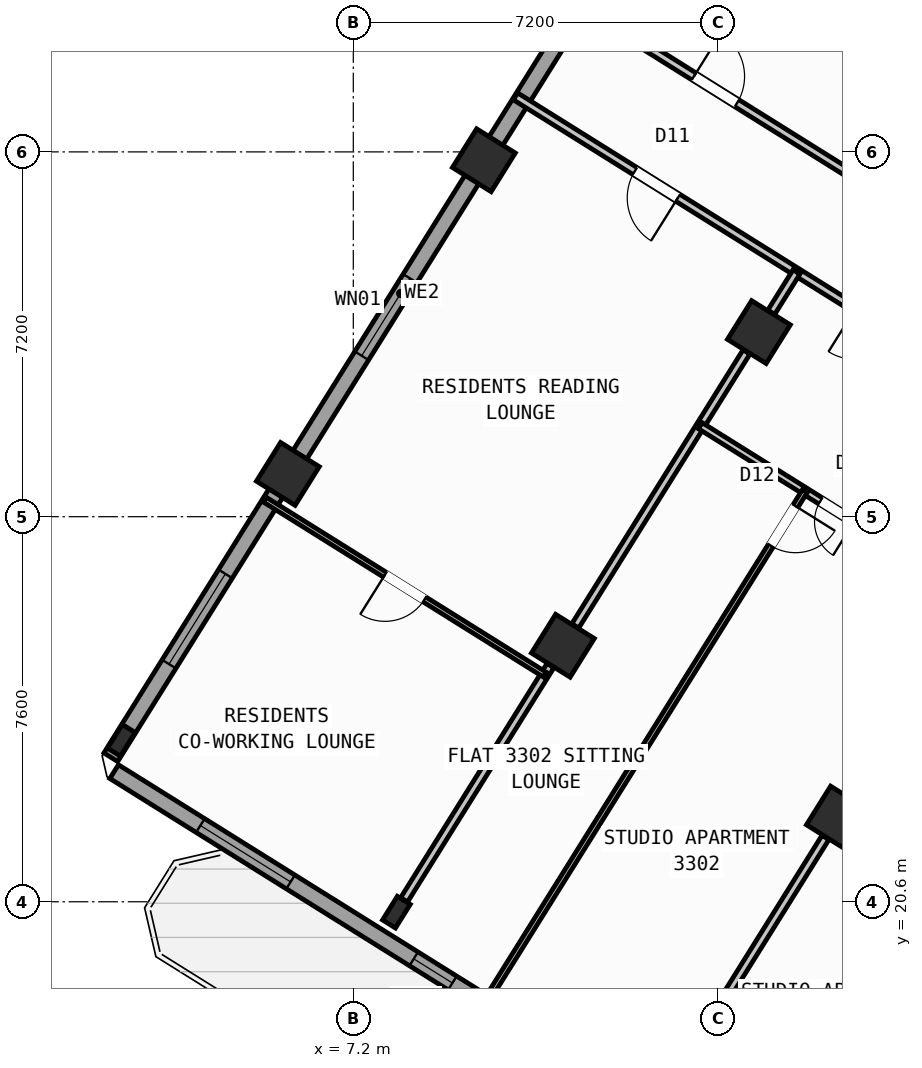
"""IFC4 building model, lengths in metres.
Left out: names, types, materials, properties, quantities, classifications, styles, units other than length and angle.
Written with IfcOpenShell. Run it as: python <this file> out.ifc"""

import sys

from ifc_helpers import new_model, si_unit, direction, frame, frame_2d, origin, origin_2d, place, context, subcontext, project, spatial, rectangle, hollow_rectangle, i_section, extrude, source, transform, mapped, element, fill, save


model = new_model("IFC4")
c1 = context("Model", 3, precision=1e-05, world=origin(), true_north=direction((0.0, 1.0)))
c2 = subcontext(c1, "Body", "Model", "MODEL_VIEW")
j1 = project(units=[si_unit("LENGTHUNIT", "METRE"), si_unit("PLANEANGLEUNIT", "RADIAN")], contexts=[c1])
p1 = place(None, origin())
s1 = spatial("IfcSite", under=j1, at=p1, CompositionType="ELEMENT")
p2 = place(p1, origin())
s2 = spatial("IfcBuilding", under=s1, at=p2, CompositionType="ELEMENT")
p3 = place(p2, frame((0.0, 0.0, 132.6)))
s3 = spatial("IfcBuildingStorey", under=s2, at=p3, CompositionType="ELEMENT", Elevation=132.6)
m1 = source(origin(), c2, "Body", "SweptSolid", [
    extrude(hollow_rectangle(XDim=0.9, YDim=0.9, WallThickness=0.036, at=origin_2d()), origin(), (0.0, 0.0, 1.0), 3.6),
])
for number, where, z_axis, x_axis in (
    (1, (16.764, 22.261, 0.0), (0.0, 0.0, 1.0), (-0.848, 0.53, 0.0)),
    (2, (15.205, 31.844, 0.0), (0.0, 0.0, 1.0), (-0.848, 0.53, 0.0)),
    (3, (11.336, 25.653, 0.0), (0.0, 0.0, 1.0), (-0.848, 0.53, 0.0)),
):
    element("IfcColumn", number, at=place(p3, frame(where, z_axis=z_axis, x_axis=x_axis)), inside=s3, PredefinedType="COLUMN", context=c2, shape_type="MappedRepresentation", body=[
        mapped(m1, transform((0.0, 0.0, 0.0), scale=1.0)),
    ])
m2 = source(origin(), c2, "Body", "SweptSolid", [
    extrude(i_section(OverallWidth=0.3, OverallDepth=0.55, WebThickness=0.015, FlangeThickness=0.029, at=origin_2d()), origin(), (0.0, 0.0, 1.0), 3.6),
])
p4 = place(p3, frame((8.051, 20.395, 0.0), z_axis=(0.0, 0.0, 1.0), x_axis=(-0.848048096156, 0.529919264233, 0.0)))
e4 = element("IfcColumn", 4, at=p4, inside=s3, PredefinedType="COLUMN", context=c2, shape_type="MappedRepresentation", body=[
    mapped(m2, transform((0.0, 0.0, 0.0), scale=1.0)),
])
for number, where, z_axis, x_axis in (
    (5, (9.777, 35.235, 0.0), (0.0, 0.0, 1.0), (-0.848, 0.53, 0.0)),
    (6, (5.909, 29.044, 0.0), (0.0, 0.0, 1.0), (-0.848, 0.53, 0.0)),
):
    element("IfcColumn", number, at=place(p3, frame(where, z_axis=z_axis, x_axis=x_axis)), inside=s3, PredefinedType="COLUMN", context=c2, shape_type="MappedRepresentation", body=[
        mapped(m1, transform((0.0, 0.0, 0.0), scale=1.0)),
    ])
p5 = place(p3, frame((2.623, 23.786, 0.0), z_axis=(0.0, 0.0, 1.0), x_axis=(-0.848048096156, 0.529919264233, 0.0)))
e7 = element("IfcColumn", 7, at=p5, inside=s3, PredefinedType="COLUMN", context=c2, shape_type="MappedRepresentation", body=[
    mapped(m2, transform((0.0, 0.0, 0.0), scale=1.0)),
])
p6 = place(p3, frame((29.268, 6.429, 0.0), z_axis=(0.0, 0.0, 1.0), x_axis=(-0.848049971435, 0.529916263149, 0.0)))
e8 = element("IfcWall", 8, at=p6, inside=s3, PredefinedType="STANDARD", context=c2, shape_type="SweptSolid", body=[
    extrude(rectangle(XDim=31.588, YDim=0.32, at=frame_2d((15.794, 0.0))), origin(), (0.0, 0.0, 1.0), 3.32),
])
p7 = place(p6, frame((16.362, 0.0, 0.0)))
e9 = element("IfcOpeningElement", 9, at=p7, cuts=e8, PredefinedType="OPENING", context=c2, shape_type="SweptSolid", body=[
    extrude(rectangle(XDim=1.2, YDim=2.15, at=frame_2d((0.6, 1.075))), frame((0.0, 0.17, 0.0), z_axis=(0.0, -1.0, 0.0), x_axis=(1.0, 0.0, 0.0)), (0.0, 0.0, 1.0), 0.34),
])
p8 = place(p6, frame((2.989, 0.0, 0.8)))
e10 = element("IfcOpeningElement", 10, at=p8, cuts=e8, PredefinedType="OPENING", context=c2, shape_type="SweptSolid", body=[
    extrude(rectangle(XDim=2.1, YDim=1.55, at=frame_2d((1.05, 0.775))), frame((0.0, 0.17, 0.0), z_axis=(0.0, -1.0, 0.0), x_axis=(1.0, 0.0, 0.0)), (0.0, 0.0, 1.0), 0.34),
])
p9 = place(p6, frame((8.359, 0.0, 0.8)))
e11 = element("IfcOpeningElement", 11, at=p9, cuts=e8, PredefinedType="OPENING", context=c2, shape_type="SweptSolid", body=[
    extrude(rectangle(XDim=2.1, YDim=1.55, at=frame_2d((1.05, 0.775))), frame((0.0, 0.17, 0.0), z_axis=(0.0, -1.0, 0.0), x_axis=(1.0, 0.0, 0.0)), (0.0, 0.0, 1.0), 0.34),
])
p10 = place(p6, frame((13.284, 0.0, 0.95)))
e12 = element("IfcOpeningElement", 12, at=p10, cuts=e8, PredefinedType="OPENING", context=c2, shape_type="SweptSolid", body=[
    extrude(rectangle(XDim=1.2, YDim=1.4, at=frame_2d((0.6, 0.7))), frame((0.0, 0.17, 0.0), z_axis=(0.0, -1.0, 0.0), x_axis=(1.0, 0.0, 0.0)), (0.0, 0.0, 1.0), 0.34),
])
p11 = place(p6, frame((20.39, 0.0, 0.95)))
e13 = element("IfcOpeningElement", 13, at=p11, cuts=e8, PredefinedType="OPENING", context=c2, shape_type="SweptSolid", body=[
    extrude(rectangle(XDim=1.2, YDim=1.4, at=frame_2d((0.6, 0.7))), frame((0.0, 0.17, 0.0), z_axis=(0.0, -1.0, 0.0), x_axis=(1.0, 0.0, 0.0)), (0.0, 0.0, 1.0), 0.34),
])
p12 = place(p6, frame((23.715, 0.0, 1.0)))
e14 = element("IfcOpeningElement", 14, at=p12, cuts=e8, PredefinedType="OPENING", context=c2, shape_type="SweptSolid", body=[
    extrude(rectangle(XDim=0.9, YDim=1.25, at=frame_2d((0.45, 0.625))), frame((0.0, 0.17, 0.0), z_axis=(0.0, -1.0, 0.0), x_axis=(1.0, 0.0, 0.0)), (0.0, 0.0, 1.0), 0.34),
])
p13 = place(p6, frame((27.481, 0.0, 0.8)))
e15 = element("IfcOpeningElement", 15, at=p13, cuts=e8, PredefinedType="OPENING", context=c2, shape_type="SweptSolid", body=[
    extrude(rectangle(XDim=2.1, YDim=1.55, at=frame_2d((1.05, 0.775))), frame((0.0, 0.17, 0.0), z_axis=(0.0, -1.0, 0.0), x_axis=(1.0, 0.0, 0.0)), (0.0, 0.0, 1.0), 0.34),
])
p14 = place(p3, frame((2.415, 23.452, 0.0), z_axis=(0.0, 0.0, 1.0), x_axis=(0.52991049553, 0.848053575387, 0.0)))
e16 = element("IfcWall", 16, at=p14, inside=s3, PredefinedType="STANDARD", context=c2, shape_type="SweptSolid", body=[
    extrude(rectangle(XDim=21.587, YDim=0.32, at=frame_2d((10.794, 0.0))), origin(), (0.0, 0.0, 1.0), 2.745),
])
p15 = place(p14, frame((2.168, 0.0, 0.8)))
e17 = element("IfcOpeningElement", 17, at=p15, cuts=e16, PredefinedType="OPENING", context=c2, shape_type="SweptSolid", body=[
    extrude(rectangle(XDim=2.1, YDim=1.55, at=frame_2d((1.05, 0.775))), frame((0.0, 0.17, 0.0), z_axis=(0.0, -1.0, 0.0), x_axis=(1.0, 0.0, 0.0)), (0.0, 0.0, 1.0), 0.34),
])
p16 = place(p14, frame((9.344, 0.0, 0.85)))
e18 = element("IfcOpeningElement", 18, at=p16, cuts=e16, PredefinedType="OPENING", context=c2, shape_type="SweptSolid", body=[
    extrude(rectangle(XDim=1.8, YDim=1.5, at=frame_2d((0.9, 0.75))), frame((0.0, 0.17, 0.0), z_axis=(0.0, -1.0, 0.0), x_axis=(1.0, 0.0, 0.0)), (0.0, 0.0, 1.0), 0.34),
])
p17 = place(p14, frame((18.459, 0.0, 0.85)))
e19 = element("IfcOpeningElement", 19, at=p17, cuts=e16, PredefinedType="OPENING", context=c2, shape_type="SweptSolid", body=[
    extrude(rectangle(XDim=1.5, YDim=1.5, at=frame_2d((0.75, 0.75))), frame((0.0, 0.17, 0.0), z_axis=(0.0, -1.0, 0.0), x_axis=(1.0, 0.0, 0.0)), (0.0, 0.0, 1.0), 0.34),
])
p18 = place(p3, frame((14.138, 41.825, 0.0), z_axis=(0.0, 0.0, 1.0), x_axis=(0.848046498049, -0.529921821731, 0.0)))
e20 = element("IfcWall", 20, at=p18, inside=s3, PredefinedType="STANDARD", context=c2, shape_type="SweptSolid", body=[
    extrude(rectangle(XDim=31.588, YDim=0.32, at=frame_2d((15.794, 0.0))), origin(), (0.0, 0.0, 1.0), 3.32),
])
p19 = place(p18, frame((3.253, 0.0, 0.0)))
e21 = element("IfcOpeningElement", 21, at=p19, cuts=e20, PredefinedType="OPENING", context=c2, shape_type="SweptSolid", body=[
    extrude(rectangle(XDim=1.05, YDim=2.15, at=frame_2d((0.525, 1.075))), frame((0.0, 0.17, 0.0), z_axis=(0.0, -1.0, 0.0), x_axis=(1.0, 0.0, 0.0)), (0.0, 0.0, 1.0), 0.34),
])
p20 = place(p18, frame((0.863, 0.0, 0.85)))
e22 = element("IfcOpeningElement", 22, at=p20, cuts=e20, PredefinedType="OPENING", context=c2, shape_type="SweptSolid", body=[
    extrude(rectangle(XDim=1.8, YDim=1.5, at=frame_2d((0.9, 0.75))), frame((0.0, 0.17, 0.0), z_axis=(0.0, -1.0, 0.0), x_axis=(1.0, 0.0, 0.0)), (0.0, 0.0, 1.0), 0.34),
])
p21 = place(p18, frame((8.435, 0.0, 0.85)))
e23 = element("IfcOpeningElement", 23, at=p21, cuts=e20, PredefinedType="OPENING", context=c2, shape_type="SweptSolid", body=[
    extrude(rectangle(XDim=1.8, YDim=1.5, at=frame_2d((0.9, 0.75))), frame((0.0, 0.17, 0.0), z_axis=(0.0, -1.0, 0.0), x_axis=(1.0, 0.0, 0.0)), (0.0, 0.0, 1.0), 0.34),
])
p22 = place(p18, frame((13.874, 0.0, 0.85)))
e24 = element("IfcOpeningElement", 24, at=p22, cuts=e20, PredefinedType="OPENING", context=c2, shape_type="SweptSolid", body=[
    extrude(rectangle(XDim=1.5, YDim=1.5, at=frame_2d((0.75, 0.75))), frame((0.0, 0.17, 0.0), z_axis=(0.0, -1.0, 0.0), x_axis=(1.0, 0.0, 0.0)), (0.0, 0.0, 1.0), 0.34),
])
p23 = place(p18, frame((17.104, 0.0, 1.0)))
e25 = element("IfcOpeningElement", 25, at=p23, cuts=e20, PredefinedType="OPENING", context=c2, shape_type="SweptSolid", body=[
    extrude(rectangle(XDim=0.9, YDim=1.25, at=frame_2d((0.45, 0.625))), frame((0.0, 0.17, 0.0), z_axis=(0.0, -1.0, 0.0), x_axis=(1.0, 0.0, 0.0)), (0.0, 0.0, 1.0), 0.34),
])
p24 = place(p18, frame((22.131, 0.0, 1.0)))
e26 = element("IfcOpeningElement", 26, at=p24, cuts=e20, PredefinedType="OPENING", context=c2, shape_type="SweptSolid", body=[
    extrude(rectangle(XDim=0.9, YDim=1.25, at=frame_2d((0.45, 0.625))), frame((0.0, 0.17, 0.0), z_axis=(0.0, -1.0, 0.0), x_axis=(1.0, 0.0, 0.0)), (0.0, 0.0, 1.0), 0.34),
])
p25 = place(p18, frame((27.706, 0.0, 1.0)))
e27 = element("IfcOpeningElement", 27, at=p25, cuts=e20, PredefinedType="OPENING", context=c2, shape_type="SweptSolid", body=[
    extrude(rectangle(XDim=0.9, YDim=1.25, at=frame_2d((0.45, 0.625))), frame((0.0, 0.17, 0.0), z_axis=(0.0, -1.0, 0.0), x_axis=(1.0, 0.0, 0.0)), (0.0, 0.0, 1.0), 0.34),
])
p26 = place(p3, frame((24.588, 27.631, 0.0), z_axis=(0.0, 0.0, 1.0), x_axis=(-0.529914586043, -0.848051019396, 0.0)))
e28 = element("IfcWall", 28, at=p26, inside=s3, PredefinedType="PARTITIONING", context=c2, shape_type="SweptSolid", body=[
    extrude(rectangle(XDim=15.35, YDim=0.16, at=frame_2d((7.675, 0.0))), origin(), (0.0, 0.0, 1.0), 3.31),
])
p27 = place(p3, frame((25.754, 29.497, 0.0), z_axis=(0.0, 0.0, 1.0), x_axis=(-0.848045850158, 0.529922858565, 0.0)))
e29 = element("IfcWall", 29, at=p27, inside=s3, PredefinedType="PARTITIONING", context=c2, shape_type="SweptSolid", body=[
    extrude(rectangle(XDim=16.73, YDim=0.16, at=frame_2d((8.365, 0.0))), origin(), (0.0, 0.0, 1.0), 3.31),
])
p28 = place(p27, frame((1.588, 0.0, 0.0)))
e30 = element("IfcOpeningElement", 30, at=p28, cuts=e29, PredefinedType="OPENING", context=c2, shape_type="SweptSolid", body=[
    extrude(rectangle(XDim=1.0, YDim=2.1, at=frame_2d((0.5, 1.05))), frame((0.0, 0.09, 0.0), z_axis=(0.0, -1.0, 0.0), x_axis=(1.0, 0.0, 0.0)), (0.0, 0.0, 1.0), 0.18),
])
p29 = place(p27, frame((6.685, 0.0, 0.0)))
e31 = element("IfcOpeningElement", 31, at=p29, cuts=e29, PredefinedType="OPENING", context=c2, shape_type="SweptSolid", body=[
    extrude(rectangle(XDim=1.0, YDim=2.1, at=frame_2d((0.5, 1.05))), frame((0.0, 0.09, 0.0), z_axis=(0.0, -1.0, 0.0), x_axis=(1.0, 0.0, 0.0)), (0.0, 0.0, 1.0), 0.18),
])
p30 = place(p27, frame((12.951, 0.0, 0.0)))
e32 = element("IfcOpeningElement", 32, at=p30, cuts=e29, PredefinedType="OPENING", context=c2, shape_type="SweptSolid", body=[
    extrude(rectangle(XDim=1.0, YDim=2.1, at=frame_2d((0.5, 1.05))), frame((0.0, 0.09, 0.0), z_axis=(0.0, -1.0, 0.0), x_axis=(1.0, 0.0, 0.0)), (0.0, 0.0, 1.0), 0.18),
])
p31 = place(p3, frame((24.588, 27.631, 0.0), z_axis=(0.0, 0.0, 1.0), x_axis=(-0.848041752158, 0.529929416617, 0.0)))
e33 = element("IfcWall", 33, at=p31, inside=s3, PredefinedType="PARTITIONING", context=c2, shape_type="SweptSolid", body=[
    extrude(rectangle(XDim=16.73, YDim=0.16, at=frame_2d((8.365, 0.0))), origin(), (0.0, 0.0, 1.0), 3.31),
])
p32 = place(p31, frame((2.22, 0.0, 0.0)))
e34 = element("IfcOpeningElement", 34, at=p32, cuts=e33, PredefinedType="OPENING", context=c2, shape_type="SweptSolid", body=[
    extrude(rectangle(XDim=0.86, YDim=2.05, at=frame_2d((0.43, 1.025))), frame((0.0, 0.09, 0.0), z_axis=(0.0, -1.0, 0.0), x_axis=(1.0, 0.0, 0.0)), (0.0, 0.0, 1.0), 0.18),
])
p33 = place(p31, frame((7.82, 0.0, 0.0)))
e35 = element("IfcOpeningElement", 35, at=p33, cuts=e33, PredefinedType="OPENING", context=c2, shape_type="SweptSolid", body=[
    extrude(rectangle(XDim=1.0, YDim=2.1, at=frame_2d((0.5, 1.05))), frame((0.0, 0.09, 0.0), z_axis=(0.0, -1.0, 0.0), x_axis=(1.0, 0.0, 0.0)), (0.0, 0.0, 1.0), 0.18),
])
p34 = place(p31, frame((12.95, 0.0, 0.0)))
e36 = element("IfcOpeningElement", 36, at=p34, cuts=e33, PredefinedType="OPENING", context=c2, shape_type="SweptSolid", body=[
    extrude(rectangle(XDim=1.0, YDim=2.1, at=frame_2d((0.5, 1.05))), frame((0.0, 0.09, 0.0), z_axis=(0.0, -1.0, 0.0), x_axis=(1.0, 0.0, 0.0)), (0.0, 0.0, 1.0), 0.18),
])
p35 = place(p3, frame((16.519, 21.87, 0.0), z_axis=(0.0, 0.0, 1.0), x_axis=(-0.529922447305, -0.848046107144, 0.0)))
e37 = element("IfcWall", 37, at=p35, inside=s3, PredefinedType="PARTITIONING", context=c2, shape_type="SweptSolid", body=[
    extrude(rectangle(XDim=5.451, YDim=0.16, at=frame_2d((2.726, 0.0))), origin(), (0.0, 0.0, 1.0), 2.745),
])
p36 = place(p3, frame((15.946, 33.031, 0.0), z_axis=(0.0, 0.0, 1.0), x_axis=(-0.529952145338, -0.848027548876, 0.0)))
e38 = element("IfcWall", 38, at=p36, inside=s3, PredefinedType="PARTITIONING", context=c2, shape_type="SweptSolid", body=[
    extrude(rectangle(XDim=0.938, YDim=0.16, at=frame_2d((0.469, 0.0))), origin(), (0.0, 0.0, 1.0), 2.745),
])
p37 = place(p3, frame((14.96, 31.452, 0.0), z_axis=(0.0, 0.0, 1.0), x_axis=(-0.529947310719, -0.848030570122, 0.0)))
e39 = element("IfcWall", 39, at=p37, inside=s3, PredefinedType="PARTITIONING", context=c2, shape_type="SweptSolid", body=[
    extrude(rectangle(XDim=6.376, YDim=0.16, at=frame_2d((3.188, 0.0))), origin(), (0.0, 0.0, 1.0), 2.745),
])
p38 = place(p3, frame((11.091, 25.261, 0.0), z_axis=(0.0, 0.0, 1.0), x_axis=(-0.52994257524, -0.848033529377, 0.0)))
e40 = element("IfcWall", 40, at=p38, inside=s3, PredefinedType="PARTITIONING", context=c2, shape_type="SweptSolid", body=[
    extrude(rectangle(XDim=5.451, YDim=0.16, at=frame_2d((2.726, 0.0))), origin(), (0.0, 0.0, 1.0), 2.745),
])
p39 = place(p3, frame((19.477, 26.603, 0.0), z_axis=(0.0, 0.0, 1.0), x_axis=(-0.848039019877, 0.529933789039, 0.0)))
e41 = element("IfcWall", 41, at=p39, inside=s3, PredefinedType="PLUMBINGWALL", context=c2, shape_type="SweptSolid", body=[
    extrude(rectangle(XDim=6.4, YDim=0.14, at=frame_2d((3.2, 0.0))), origin(), (0.0, 0.0, 1.0), 3.31),
])
p40 = place(p39, frame((2.824, 0.0, 0.0)))
e42 = element("IfcOpeningElement", 42, at=p40, cuts=e41, PredefinedType="OPENING", context=c2, shape_type="SweptSolid", body=[
    extrude(rectangle(XDim=0.78, YDim=2.05, at=frame_2d((0.39, 1.025))), frame((0.0, 0.08, 0.0), z_axis=(0.0, -1.0, 0.0), x_axis=(1.0, 0.0, 0.0)), (0.0, 0.0, 1.0), 0.16),
])
p41 = place(p3, frame((16.112, 28.706, 0.0), z_axis=(0.0, 0.0, 1.0), x_axis=(-0.529929676091, -0.848041590017, 0.0)))
e43 = element("IfcWall", 43, at=p41, inside=s3, PredefinedType="PARTITIONING", context=c2, shape_type="SweptSolid", body=[
    extrude(rectangle(XDim=12.04, YDim=0.11, at=frame_2d((6.02, 0.0))), origin(), (0.0, 0.0, 1.0), 3.31),
])
p42 = place(p41, frame((0.35, 0.0, 0.0)))
e44 = element("IfcOpeningElement", 44, at=p42, cuts=e43, PredefinedType="OPENING", context=c2, shape_type="SweptSolid", body=[
    extrude(rectangle(XDim=0.92, YDim=2.08, at=frame_2d((0.46, 1.04))), frame((0.0, 0.065, 0.0), z_axis=(0.0, -1.0, 0.0), x_axis=(1.0, 0.0, 0.0)), (0.0, 0.0, 1.0), 0.13),
])
p43 = place(p3, frame((10.98, 25.083, 0.0), z_axis=(0.0, 0.0, 1.0), x_axis=(-0.848048787466, 0.529918157905, 0.0)))
e45 = element("IfcWall", 45, at=p43, inside=s3, PredefinedType="PARTITIONING", context=c2, shape_type="SweptSolid", body=[
    extrude(rectangle(XDim=6.52, YDim=0.11, at=frame_2d((3.26, 0.0))), origin(), (0.0, 0.0, 1.0), 3.31),
])
p44 = place(p43, frame((2.8, 0.0, 0.0)))
e46 = element("IfcOpeningElement", 46, at=p44, cuts=e45, PredefinedType="OPENING", context=c2, shape_type="SweptSolid", body=[
    extrude(rectangle(XDim=0.92, YDim=2.08, at=frame_2d((0.46, 1.04))), frame((0.0, 0.065, 0.0), z_axis=(0.0, -1.0, 0.0), x_axis=(1.0, 0.0, 0.0)), (0.0, 0.0, 1.0), 0.13),
])
m3 = source(origin(), c2, "Body", "SweptSolid", [
    extrude(rectangle(XDim=0.9, YDim=1.25, at=frame_2d((0.45, 0.625))), frame((0.0, 0.03, 0.0), z_axis=(0.0, -1.0, 0.0), x_axis=(1.0, 0.0, 0.0)), (0.0, 0.0, 1.0), 0.06),
])
p45 = place(p12, origin())
e47 = element("IfcWindow", 47, at=p45, inside=s3, PartitioningType="SINGLE_PANEL", PredefinedType="WINDOW", context=c2, shape_type="MappedRepresentation", body=[
    mapped(m3, transform((0.0, 0.0, 0.0), scale=1.0)),
])
fill(e14, e47)
m4 = source(origin(), c2, "Body", "SweptSolid", [
    extrude(rectangle(XDim=2.1, YDim=1.55, at=frame_2d((1.05, 0.775))), frame((0.0, 0.03, 0.0), z_axis=(0.0, -1.0, 0.0), x_axis=(1.0, 0.0, 0.0)), (0.0, 0.0, 1.0), 0.06),
])
p46 = place(p13, origin())
e48 = element("IfcWindow", 48, at=p46, inside=s3, PartitioningType="SINGLE_PANEL", PredefinedType="WINDOW", context=c2, shape_type="MappedRepresentation", body=[
    mapped(m4, transform((0.0, 0.0, 0.0), scale=1.0)),
])
fill(e15, e48)
p47 = place(p15, origin())
e49 = element("IfcWindow", 49, at=p47, inside=s3, PartitioningType="SINGLE_PANEL", PredefinedType="WINDOW", context=c2, shape_type="MappedRepresentation", body=[
    mapped(m4, transform((0.0, 0.0, 0.0), scale=1.0)),
])
fill(e17, e49)
m5 = source(origin(), c2, "Body", "SweptSolid", [
    extrude(rectangle(XDim=1.8, YDim=1.5, at=frame_2d((0.9, 0.75))), frame((0.0, 0.03, 0.0), z_axis=(0.0, -1.0, 0.0), x_axis=(1.0, 0.0, 0.0)), (0.0, 0.0, 1.0), 0.06),
])
p48 = place(p16, origin())
e50 = element("IfcWindow", 50, at=p48, inside=s3, PartitioningType="SINGLE_PANEL", PredefinedType="WINDOW", context=c2, shape_type="MappedRepresentation", body=[
    mapped(m5, transform((0.0, 0.0, 0.0), scale=1.0)),
])
fill(e18, e50)
m6 = source(origin(), c2, "Body", "SweptSolid", [
    extrude(rectangle(XDim=0.92, YDim=2.08, at=frame_2d((0.46, 1.04))), frame((0.0, 0.025, 0.0), z_axis=(0.0, -1.0, 0.0), x_axis=(1.0, 0.0, 0.0)), (0.0, 0.0, 1.0), 0.05),
])
p49 = place(p42, origin())
e51 = element("IfcDoor", 51, at=p49, inside=s3, OperationType="SINGLE_SWING_LEFT", PredefinedType="DOOR", context=c2, shape_type="MappedRepresentation", body=[
    mapped(m6, transform((0.0, 0.0, 0.0), scale=1.0)),
])
fill(e44, e51)
m7 = source(origin(), c2, "Body", "SweptSolid", [
    extrude(rectangle(XDim=0.78, YDim=2.05, at=frame_2d((0.39, 1.025))), frame((0.0, 0.025, 0.0), z_axis=(0.0, -1.0, 0.0), x_axis=(1.0, 0.0, 0.0)), (0.0, 0.0, 1.0), 0.05),
])
p50 = place(p40, origin())
e52 = element("IfcDoor", 52, at=p50, inside=s3, OperationType="SINGLE_SWING_LEFT", PredefinedType="DOOR", context=c2, shape_type="MappedRepresentation", body=[
    mapped(m7, transform((0.0, 0.0, 0.0), scale=1.0)),
])
fill(e42, e52)
m8 = source(origin(), c2, "Body", "SweptSolid", [
    extrude(rectangle(XDim=1.0, YDim=2.1, at=frame_2d((0.5, 1.05))), frame((0.0, 0.025, 0.0), z_axis=(0.0, -1.0, 0.0), x_axis=(1.0, 0.0, 0.0)), (0.0, 0.0, 1.0), 0.05),
])
p51 = place(p34, origin())
e53 = element("IfcDoor", 53, at=p51, inside=s3, OperationType="SINGLE_SWING_LEFT", PredefinedType="DOOR", context=c2, shape_type="MappedRepresentation", body=[
    mapped(m8, transform((0.0, 0.0, 0.0), scale=1.0)),
])
fill(e36, e53)
p52 = place(p44, origin())
e54 = element("IfcDoor", 54, at=p52, inside=s3, OperationType="SINGLE_SWING_RIGHT", PredefinedType="DOOR", context=c2, shape_type="MappedRepresentation", body=[
    mapped(m6, transform((0.0, 0.0, 0.0), scale=1.0)),
])
fill(e46, e54)
p53 = place(p30, frame((1.0, 0.0, 0.0), z_axis=(0.0, 0.0, 1.0), x_axis=(-1.0, 0.0, 0.0)))
e55 = element("IfcDoor", 55, at=p53, inside=s3, OperationType="SINGLE_SWING_LEFT", PredefinedType="DOOR", context=c2, shape_type="MappedRepresentation", body=[
    mapped(m8, transform((0.0, 0.0, 0.0), scale=1.0)),
])
fill(e32, e55)
save(model, sys.argv[1])
